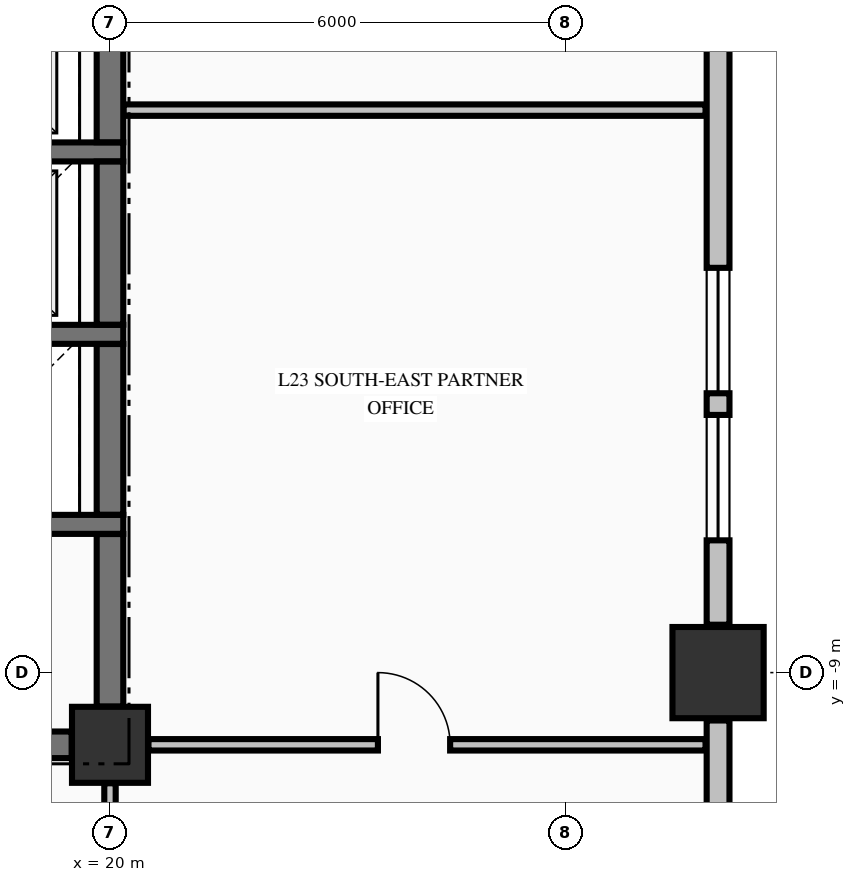
"""IFC4 building model, lengths in metres.
Left out: names, types, materials, properties, quantities, classifications, styles, units other than length and angle.
Written with IfcOpenShell. Run it as: python <this file> out.ifc"""

import sys

from ifc_helpers import new_model, si_unit, direction, frame, frame_2d, origin, origin_2d, place, context, subcontext, project, spatial, rectangle, extrude, element, fill, save


model = new_model("IFC4")
c1 = context("Model", 3, precision=1e-05, world=origin(), true_north=direction((0.0, 1.0)))
c2 = subcontext(c1, "Body", "Model", "MODEL_VIEW")
j1 = project(units=[si_unit("LENGTHUNIT", "METRE"), si_unit("PLANEANGLEUNIT", "RADIAN")], contexts=[c1])
p1 = place(None, origin())
s1 = spatial("IfcSite", under=j1, at=p1, CompositionType="ELEMENT")
p2 = place(p1, origin())
s2 = spatial("IfcBuilding", under=s1, at=p2, CompositionType="ELEMENT")
p3 = place(p2, frame((0.0, 0.0, 94.93)))
s3 = spatial("IfcBuildingStorey", under=s2, at=p3, CompositionType="ELEMENT", Elevation=94.93)
p4 = place(p3, frame((28.0, -9.0, -0.25), z_axis=(0.0, 0.0, 1.0), x_axis=(1.0, 0.0, 0.0)))
e1 = element("IfcColumn", 1, at=p4, inside=s3, PredefinedType="COLUMN", context=c2, shape_type="SweptSolid", body=[
    extrude(rectangle(XDim=1.2, YDim=1.2, at=origin_2d()), origin(), (0.0, 0.0, 1.0), 3.545),
])
p5 = place(p3, frame((20.0, -9.95, -0.25), z_axis=(0.0, 0.0, 1.0), x_axis=(1.0, 0.0, 0.0)))
e2 = element("IfcColumn", 2, at=p5, inside=s3, PredefinedType="COLUMN", context=c2, shape_type="SweptSolid", body=[
    extrude(rectangle(XDim=1.0, YDim=1.0, at=origin_2d()), origin(), (0.0, 0.0, 1.0), 3.545),
])
p6 = place(p3, frame((28.0, -20.37, 0.0), z_axis=(0.0, 0.0, 1.0), x_axis=(0.0, 1.0, 0.0)))
e3 = element("IfcWall", 3, at=p6, inside=s3, PredefinedType="STANDARD", context=c2, shape_type="SweptSolid", body=[
    extrude(rectangle(XDim=10.74, YDim=0.3, at=frame_2d((5.37, 0.0))), origin(), (0.0, 0.0, 1.0), 2.687),
])
p7 = place(p3, frame((28.0, -8.37, 0.0), z_axis=(0.0, 0.0, 1.0), x_axis=(0.0, 1.0, 0.0)))
e4 = element("IfcWall", 4, at=p7, inside=s3, PredefinedType="STANDARD", context=c2, shape_type="SweptSolid", body=[
    extrude(rectangle(XDim=7.74, YDim=0.3, at=frame_2d((3.87, 0.0))), origin(), (0.0, 0.0, 1.0), 2.687),
])
p8 = place(p7, frame((1.11, 0.0, 0.8)))
e5 = element("IfcOpeningElement", 5, at=p8, cuts=e4, PredefinedType="OPENING", context=c2, shape_type="SweptSolid", body=[
    extrude(rectangle(XDim=1.65, YDim=1.7, at=frame_2d((0.825, 0.85))), frame((0.0, 0.16, 0.0), z_axis=(0.0, -1.0, 0.0), x_axis=(1.0, 0.0, 0.0)), (0.0, 0.0, 1.0), 0.32),
])
p9 = place(p7, frame((3.045, 0.0, 0.8)))
e6 = element("IfcOpeningElement", 6, at=p9, cuts=e4, PredefinedType="OPENING", context=c2, shape_type="SweptSolid", body=[
    extrude(rectangle(XDim=1.65, YDim=1.7, at=frame_2d((0.825, 0.85))), frame((0.0, 0.16, 0.0), z_axis=(0.0, -1.0, 0.0), x_axis=(1.0, 0.0, 0.0)), (0.0, 0.0, 1.0), 0.32),
])
p10 = place(p3, frame((14.7, -9.95, 0.0), z_axis=(0.0, 0.0, 1.0), x_axis=(1.0, 0.0, 0.0)))
e7 = element("IfcWall", 7, at=p10, inside=s3, PredefinedType="SHEAR", context=c2, shape_type="SweptSolid", body=[
    extrude(rectangle(XDim=4.796, YDim=0.35, at=frame_2d((2.398, 0.0))), origin(), (0.0, 0.0, 1.0), 3.295),
])
p11 = place(p10, frame((0.65, 0.0, 0.0)))
e8 = element("IfcOpeningElement", 8, at=p11, cuts=e7, PredefinedType="OPENING", context=c2, shape_type="SweptSolid", body=[
    extrude(rectangle(XDim=1.2, YDim=2.15, at=frame_2d((0.6, 1.075))), frame((0.0, 0.185, 0.0), z_axis=(0.0, -1.0, 0.0), x_axis=(1.0, 0.0, 0.0)), (0.0, 0.0, 1.0), 0.37),
])
for number, where, z_axis, x_axis in (
    (9, (17.025, -7.05, 0.0), (0.0, 0.0, 1.0), (1.0, 0.0, 0.0)),
    (10, (17.025, -4.55, 0.0), (0.0, 0.0, 1.0), (1.0, 0.0, 0.0)),
    (11, (17.025, -2.15, 0.0), (0.0, 0.0, 1.0), (1.0, 0.0, 0.0)),
):
    element("IfcWall", number, at=place(p3, frame(where, z_axis=z_axis, x_axis=x_axis)), inside=s3, PredefinedType="SOLIDWALL", context=c2, shape_type="SweptSolid", body=[
        extrude(rectangle(XDim=3.15, YDim=0.25, at=frame_2d((1.575, 0.0))), origin(), (0.0, 0.0, 1.0), 3.295),
    ])
p12 = place(p3, frame((20.506, -9.95, 0.0), z_axis=(0.0, 0.0, 1.0), x_axis=(1.0, 0.0, 0.0)))
e12 = element("IfcWall", 12, at=p12, inside=s3, PredefinedType="PARTITIONING", context=c2, shape_type="SweptSolid", body=[
    extrude(rectangle(XDim=7.329, YDim=0.15, at=frame_2d((3.665, 0.0))), origin(), (0.0, 0.0, 1.0), 3.295),
])
p13 = place(p12, frame((3.019, 0.0, 0.0)))
e13 = element("IfcOpeningElement", 13, at=p13, cuts=e12, PredefinedType="OPENING", context=c2, shape_type="SweptSolid", body=[
    extrude(rectangle(XDim=0.95, YDim=2.15, at=frame_2d((0.475, 1.075))), frame((0.0, 0.085, 0.0), z_axis=(0.0, -1.0, 0.0), x_axis=(1.0, 0.0, 0.0)), (0.0, 0.0, 1.0), 0.17),
])
p14 = place(p3, frame((20.178, -1.6, 0.0), z_axis=(0.0, 0.0, 1.0), x_axis=(1.0, 0.0, 0.0)))
e14 = element("IfcWall", 14, at=p14, inside=s3, PredefinedType="PARTITIONING", context=c2, shape_type="SweptSolid", body=[
    extrude(rectangle(XDim=7.657, YDim=0.15, at=frame_2d((3.829, 0.0))), origin(), (0.0, 0.0, 1.0), 3.295),
])
p15 = place(p3, frame((20.0, -9.446, 0.0), z_axis=(0.0, 0.0, 1.0), x_axis=(0.0, 1.0, 0.0)))
e15 = element("IfcWall", 15, at=p15, inside=s3, PredefinedType="SHEAR", context=c2, shape_type="SweptSolid", body=[
    extrude(rectangle(XDim=2.269, YDim=0.35, at=frame_2d((1.135, 0.0))), origin(), (0.0, 0.0, 1.0), 3.295),
])
p16 = place(p3, frame((20.0, -6.923, 0.0), z_axis=(0.0, 0.0, 1.0), x_axis=(0.0, 1.0, 0.0)))
e16 = element("IfcWall", 16, at=p16, inside=s3, PredefinedType="SHEAR", context=c2, shape_type="SweptSolid", body=[
    extrude(rectangle(XDim=2.246, YDim=0.35, at=frame_2d((1.123, 0.0))), origin(), (0.0, 0.0, 1.0), 3.295),
])
p17 = place(p3, frame((20.0, -4.423, 0.0), z_axis=(0.0, 0.0, 1.0), x_axis=(0.0, 1.0, 0.0)))
e17 = element("IfcWall", 17, at=p17, inside=s3, PredefinedType="SHEAR", context=c2, shape_type="SweptSolid", body=[
    extrude(rectangle(XDim=2.146, YDim=0.35, at=frame_2d((1.073, 0.0))), origin(), (0.0, 0.0, 1.0), 3.295),
])
p18 = place(p3, frame((20.0, -2.023, 0.0), z_axis=(0.0, 0.0, 1.0), x_axis=(0.0, 1.0, 0.0)))
e18 = element("IfcWall", 18, at=p18, inside=s3, PredefinedType="SHEAR", context=c2, shape_type="SweptSolid", body=[
    extrude(rectangle(XDim=1.519, YDim=0.35, at=frame_2d((0.76, 0.0))), origin(), (0.0, 0.0, 1.0), 3.295),
])
p19 = place(p3, frame((20.0, -13.022, 0.0), z_axis=(0.0, 0.0, 1.0), x_axis=(0.0, 1.0, 0.0)))
e19 = element("IfcWall", 19, at=p19, inside=s3, PredefinedType="PARTITIONING", context=c2, shape_type="SweptSolid", body=[
    extrude(rectangle(XDim=2.566, YDim=0.15, at=frame_2d((1.283, 0.0))), origin(), (0.0, 0.0, 1.0), 2.785),
])
p20 = place(p19, frame((1.027, 0.0, 0.0)))
e20 = element("IfcOpeningElement", 20, at=p20, cuts=e19, PredefinedType="OPENING", context=c2, shape_type="SweptSolid", body=[
    extrude(rectangle(XDim=0.95, YDim=2.15, at=frame_2d((0.475, 1.075))), frame((0.0, 0.085, 0.0), z_axis=(0.0, -1.0, 0.0), x_axis=(1.0, 0.0, 0.0)), (0.0, 0.0, 1.0), 0.17),
])
p21 = place(p8, origin())
e21 = element("IfcWindow", 21, at=p21, inside=s3, PartitioningType="SINGLE_PANEL", PredefinedType="WINDOW", context=c2, shape_type="SweptSolid", body=[
    extrude(rectangle(XDim=1.65, YDim=1.7, at=frame_2d((0.825, 0.85))), frame((0.0, 0.03, 0.0), z_axis=(0.0, -1.0, 0.0), x_axis=(1.0, 0.0, 0.0)), (0.0, 0.0, 1.0), 0.06),
])
fill(e5, e21)
p22 = place(p9, origin())
e22 = element("IfcWindow", 22, at=p22, inside=s3, PartitioningType="SINGLE_PANEL", PredefinedType="WINDOW", context=c2, shape_type="SweptSolid", body=[
    extrude(rectangle(XDim=1.65, YDim=1.7, at=frame_2d((0.825, 0.85))), frame((0.0, 0.03, 0.0), z_axis=(0.0, -1.0, 0.0), x_axis=(1.0, 0.0, 0.0)), (0.0, 0.0, 1.0), 0.06),
])
fill(e6, e22)
p23 = place(p13, origin())
e23 = element("IfcDoor", 23, at=p23, inside=s3, OperationType="SINGLE_SWING_LEFT", PredefinedType="DOOR", context=c2, shape_type="SweptSolid", body=[
    extrude(rectangle(XDim=0.95, YDim=2.15, at=frame_2d((0.475, 1.075))), frame((0.0, 0.025, 0.0), z_axis=(0.0, -1.0, 0.0), x_axis=(1.0, 0.0, 0.0)), (0.0, 0.0, 1.0), 0.05),
])
fill(e13, e23)
save(model, sys.argv[1])
